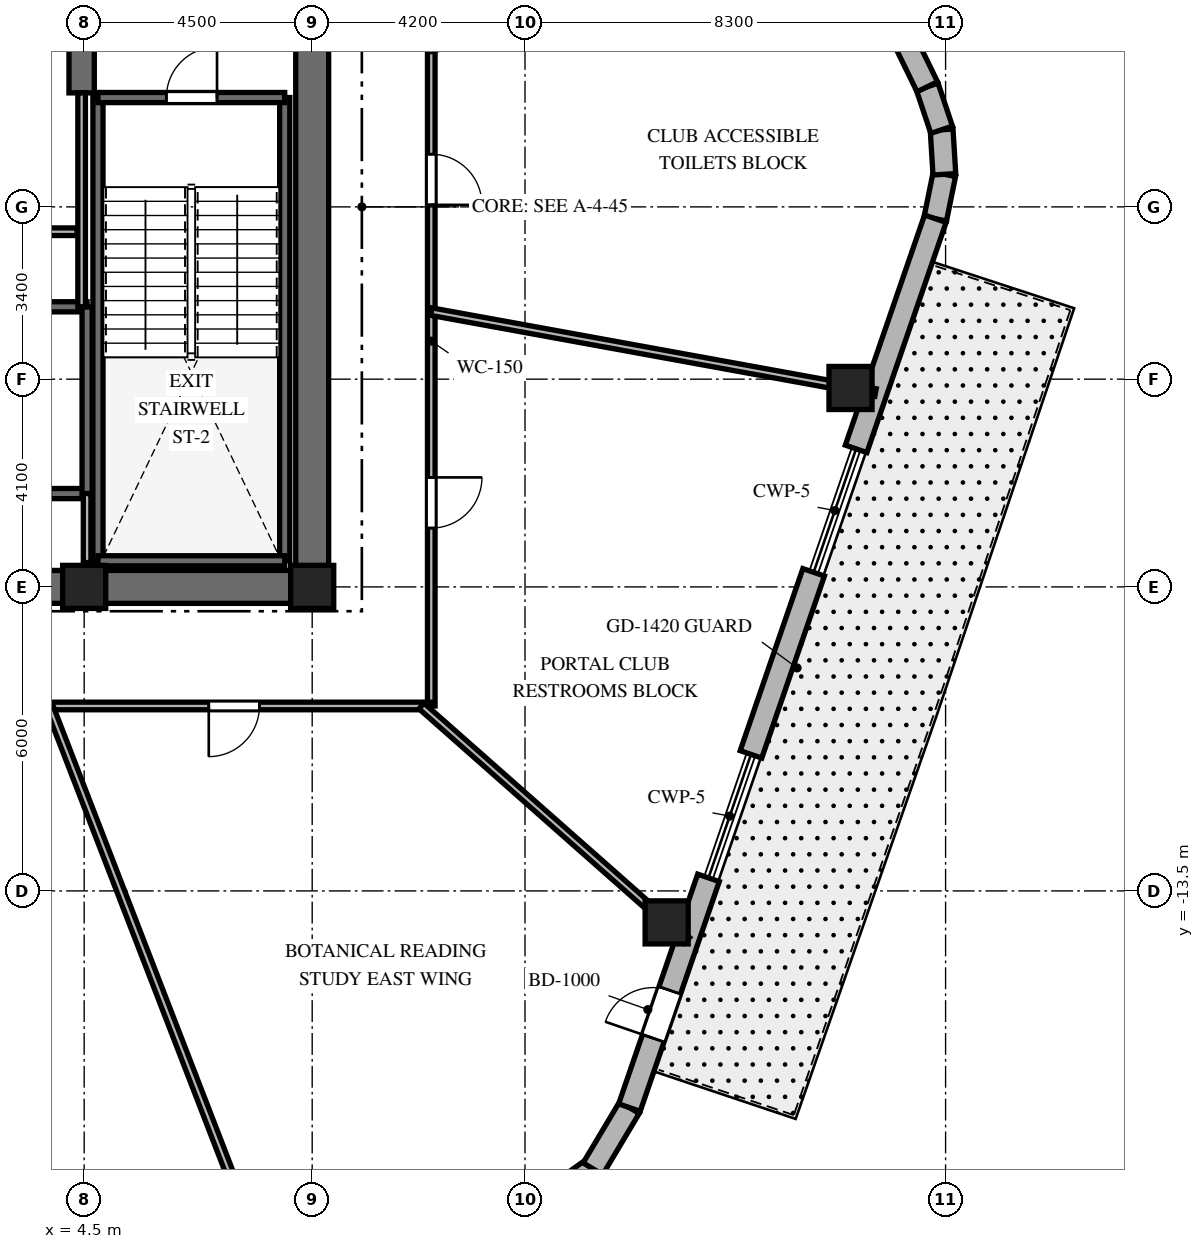
"""IFC4 building model, lengths in metres.
Left out: names, types, materials, properties, quantities, classifications, styles, units other than length and angle.
Written with IfcOpenShell. Run it as: python <this file> out.ifc"""

import sys

from ifc_helpers import new_model, si_unit, direction, frame, frame_2d, origin, origin_2d, place, context, subcontext, project, spatial, rectangle, extrude, element, fill, save


model = new_model("IFC4")
c1 = context("Model", 3, precision=1e-05, world=origin(), true_north=direction((0.0, 1.0)))
c2 = subcontext(c1, "Body", "Model", "MODEL_VIEW")
j1 = project(units=[si_unit("LENGTHUNIT", "METRE"), si_unit("PLANEANGLEUNIT", "RADIAN")], contexts=[c1])
p1 = place(None, origin())
s1 = spatial("IfcSite", under=j1, at=p1, CompositionType="ELEMENT")
p2 = place(p1, origin())
s2 = spatial("IfcBuilding", under=s1, at=p2, CompositionType="ELEMENT")
p3 = place(p2, frame((0.0, 0.0, 293.1)))
s3 = spatial("IfcBuildingStorey", under=s2, at=p3, CompositionType="ELEMENT", Elevation=293.1)
p4 = place(p3, frame((-9.325, -7.5, 0.0), z_axis=(0.0, 0.0, 1.0), x_axis=(1.0, 0.0, 0.0)))
e1 = element("IfcWall", 1, at=p4, inside=s3, PredefinedType="SHEAR", context=c2, shape_type="SweptSolid", body=[
    extrude(rectangle(XDim=18.65, YDim=0.65, at=frame_2d((9.325, 0.0))), origin(), (0.0, 0.0, 1.0), 4.5),
])
p5 = place(p4, frame((9.375, 0.0, 0.0)))
e2 = element("IfcOpeningElement", 2, at=p5, cuts=e1, PredefinedType="OPENING", context=c2, shape_type="SweptSolid", body=[
    extrude(rectangle(XDim=1.0, YDim=2.15, at=frame_2d((0.5, 1.075))), frame((0.0, 0.335, 0.0), z_axis=(0.0, -1.0, 0.0), x_axis=(1.0, 0.0, 0.0)), (0.0, 0.0, 1.0), 0.67),
])
p6 = place(p3, frame((9.0, -7.175, 0.0), z_axis=(0.0, 0.0, 1.0), x_axis=(0.0, 1.0, 0.0)))
e3 = element("IfcWall", 3, at=p6, inside=s3, PredefinedType="SHEAR", context=c2, shape_type="SweptSolid", body=[
    extrude(rectangle(XDim=14.35, YDim=0.65, at=frame_2d((7.175, 0.0))), origin(), (0.0, 0.0, 1.0), 4.5),
])
p7 = place(p6, frame((10.3, 0.0, 0.0)))
e4 = element("IfcOpeningElement", 4, at=p7, cuts=e3, PredefinedType="OPENING", context=c2, shape_type="SweptSolid", body=[
    extrude(rectangle(XDim=1.05, YDim=2.15, at=frame_2d((0.525, 1.075))), frame((0.0, 0.335, 0.0), z_axis=(0.0, -1.0, 0.0), x_axis=(1.0, 0.0, 0.0)), (0.0, 0.0, 1.0), 0.67),
])
p8 = place(p3, frame((4.45, 2.25, 0.0), z_axis=(0.0, 0.0, 1.0), x_axis=(0.0, 1.0, 0.0)))
e5 = element("IfcWall", 5, at=p8, inside=s3, PredefinedType="SHEAR", context=c2, shape_type="SweptSolid", body=[
    extrude(rectangle(XDim=4.925, YDim=0.5, at=frame_2d((2.462, 0.0))), origin(), (0.0, 0.0, 1.0), 4.5),
])
for number, where, z_axis, x_axis in (
    (6, (4.772, -6.985, 0.0), (0.0, 0.0, 1.0), (0.0, 1.0, 0.0)),
    (7, (8.458, -6.985, 0.0), (0.0, 0.0, 1.0), (0.0, 1.0, 0.0)),
):
    element("IfcWall", number, at=place(p3, frame(where, z_axis=z_axis, x_axis=x_axis)), inside=s3, PredefinedType="SHEAR", context=c2, shape_type="SweptSolid", body=[
        extrude(rectangle(XDim=9.143, YDim=0.2, at=frame_2d((4.572, 0.0))), origin(), (0.0, 0.0, 1.0), 4.5),
    ])
p9 = place(p3, frame((4.772, -6.985, 0.0), z_axis=(0.0, 0.0, 1.0), x_axis=(1.0, 0.0, 0.0)))
e8 = element("IfcWall", 8, at=p9, inside=s3, PredefinedType="SHEAR", context=c2, shape_type="SweptSolid", body=[
    extrude(rectangle(XDim=3.686, YDim=0.2, at=frame_2d((1.843, 0.0))), origin(), (0.0, 0.0, 1.0), 4.5),
])
p10 = place(p3, frame((4.772, 2.158, 0.0), z_axis=(0.0, 0.0, 1.0), x_axis=(1.0, 0.0, 0.0)))
e9 = element("IfcWall", 9, at=p10, inside=s3, PredefinedType="SHEAR", context=c2, shape_type="SweptSolid", body=[
    extrude(rectangle(XDim=3.686, YDim=0.2, at=frame_2d((1.843, 0.0))), origin(), (0.0, 0.0, 1.0), 4.5),
])
p11 = place(p10, frame((1.35, 0.0, 0.0)))
e10 = element("IfcOpeningElement", 10, at=p11, cuts=e9, PredefinedType="OPENING", context=c2, shape_type="SweptSolid", body=[
    extrude(rectangle(XDim=1.0, YDim=2.15, at=frame_2d((0.5, 1.075))), frame((0.0, 0.11, 0.0), z_axis=(0.0, -1.0, 0.0), x_axis=(1.0, 0.0, 0.0)), (0.0, 0.0, 1.0), 0.22),
])
p12 = place(p3, frame((-4.608, -5.658, 0.0), z_axis=(0.0, 0.0, 1.0), x_axis=(1.0, 0.0, 0.0)))
e11 = element("IfcWall", 11, at=p12, inside=s3, PredefinedType="SHEAR", context=c2, shape_type="SweptSolid", body=[
    extrude(rectangle(XDim=9.166, YDim=0.2, at=frame_2d((4.583, 0.0))), origin(), (0.0, 0.0, 1.0), 4.5),
])
p13 = place(p12, frame((7.45, 0.0, 0.0)))
e12 = element("IfcOpeningElement", 12, at=p13, cuts=e11, PredefinedType="OPENING", context=c2, shape_type="SweptSolid", body=[
    extrude(rectangle(XDim=1.0, YDim=2.15, at=frame_2d((0.5, 1.075))), frame((0.0, 0.11, 0.0), z_axis=(0.0, -1.0, 0.0), x_axis=(1.0, 0.0, 0.0)), (0.0, 0.0, 1.0), 0.22),
])
p14 = place(p3, frame((-4.608, -1.972, 0.0), z_axis=(0.0, 0.0, 1.0), x_axis=(1.0, 0.0, 0.0)))
e13 = element("IfcWall", 13, at=p14, inside=s3, PredefinedType="SHEAR", context=c2, shape_type="SweptSolid", body=[
    extrude(rectangle(XDim=9.166, YDim=0.2, at=frame_2d((4.583, 0.0))), origin(), (0.0, 0.0, 1.0), 4.5),
])
p15 = place(p3, frame((4.558, -5.658, 0.0), z_axis=(0.0, 0.0, 1.0), x_axis=(0.0, 1.0, 0.0)))
e14 = element("IfcWall", 14, at=p15, inside=s3, PredefinedType="SHEAR", context=c2, shape_type="SweptSolid", body=[
    extrude(rectangle(XDim=3.686, YDim=0.2, at=frame_2d((1.843, 0.0))), origin(), (0.0, 0.0, 1.0), 4.5),
])
for number, where, z_axis, x_axis in (
    (15, (4.5, -7.5, 0.0), (0.0, 0.0, 1.0), (1.0, 0.0, 0.0)),
    (16, (9.0, -7.5, 0.0), (0.0, 0.0, 1.0), (1.0, 0.0, 0.0)),
    (17, (15.995, -14.121, 0.0), (0.0, 0.0, 1.0), (1.0, 0.0, 0.0)),
    (18, (19.624, -3.574, 0.0), (0.0, 0.0, 1.0), (1.0, 0.0, 0.0)),
):
    element("IfcColumn", number, at=place(p3, frame(where, z_axis=z_axis, x_axis=x_axis)), inside=s3, PredefinedType="COLUMN", context=c2, shape_type="SweptSolid", body=[
        extrude(rectangle(XDim=0.85, YDim=0.85, at=origin_2d()), origin(), (0.0, 0.0, 1.0), 4.5),
    ])
p16 = place(p3, frame((13.415, -19.787, 0.0), z_axis=(0.0, 0.0, 1.0), x_axis=(0.814055493997, 0.580787097561, 0.0)))
e19 = element("IfcWall", 19, at=p16, inside=s3, PredefinedType="SOLIDWALL", context=c2, shape_type="SweptSolid", body=[
    extrude(rectangle(XDim=1.383, YDim=0.45, at=frame_2d((0.691, 0.0))), origin(), (0.0, 0.0, 1.0), 4.18),
])
p17 = place(p3, frame((14.54, -18.984, 0.0), z_axis=(0.0, 0.0, 1.0), x_axis=(0.512374906623, 0.858761873317, 0.0)))
e20 = element("IfcWall", 20, at=p17, inside=s3, PredefinedType="SOLIDWALL", context=c2, shape_type="SweptSolid", body=[
    extrude(rectangle(XDim=1.406, YDim=0.45, at=frame_2d((0.703, 0.0))), origin(), (0.0, 0.0, 1.0), 4.18),
])
p18 = place(p3, frame((21.298, -0.233, 0.0), z_axis=(0.0, 0.0, 1.0), x_axis=(0.199158176661, 0.979967356941, 0.0)))
e21 = element("IfcWall", 21, at=p18, inside=s3, PredefinedType="SOLIDWALL", context=c2, shape_type="SweptSolid", body=[
    extrude(rectangle(XDim=0.895, YDim=0.45, at=frame_2d((0.447, 0.0))), origin(), (0.0, 0.0, 1.0), 4.18),
])
p19 = place(p3, frame((21.476, 0.644, 0.0), z_axis=(0.0, 0.0, 1.0), x_axis=(-0.061031097918, 0.998135865044, 0.0)))
e22 = element("IfcWall", 22, at=p19, inside=s3, PredefinedType="SOLIDWALL", context=c2, shape_type="SweptSolid", body=[
    extrude(rectangle(XDim=0.88, YDim=0.45, at=frame_2d((0.44, 0.0))), origin(), (0.0, 0.0, 1.0), 4.18),
])
p20 = place(p3, frame((21.422, 1.522, 0.0), z_axis=(0.0, 0.0, 1.0), x_axis=(-0.316964162323, 0.94843751497, 0.0)))
e23 = element("IfcWall", 23, at=p20, inside=s3, PredefinedType="SOLIDWALL", context=c2, shape_type="SweptSolid", body=[
    extrude(rectangle(XDim=0.895, YDim=0.45, at=frame_2d((0.448, 0.0))), origin(), (0.0, 0.0, 1.0), 4.18),
])
p21 = place(p3, frame((15.26, -17.776, 0.0), z_axis=(0.0, 0.0, 1.0), x_axis=(0.325408461582, 0.945573547182, 0.0)))
e24 = element("IfcWall", 24, at=p21, inside=s3, PredefinedType="SOLIDWALL", context=c2, shape_type="SweptSolid", body=[
    extrude(rectangle(XDim=4.795, YDim=0.45, at=frame_2d((2.397, 0.0))), origin(), (0.0, 0.0, 1.0), 4.18),
])
p22 = place(p21, frame((1.447, 0.0, 0.0)))
e25 = element("IfcOpeningElement", 25, at=p22, cuts=e24, PredefinedType="OPENING", context=c2, shape_type="SweptSolid", body=[
    extrude(rectangle(XDim=1.0, YDim=2.15, at=frame_2d((0.5, 1.075))), frame((0.0, 0.235, 0.0), z_axis=(0.0, -1.0, 0.0), x_axis=(1.0, 0.0, 0.0)), (0.0, 0.0, 1.0), 0.47),
])
p23 = place(p3, frame((17.659, -10.805, 0.0), z_axis=(0.0, 0.0, 1.0), x_axis=(0.325406534544, 0.945574210349, 0.0)))
e26 = element("IfcWall", 26, at=p23, inside=s3, PredefinedType="SOLIDWALL", context=c2, shape_type="SweptSolid", body=[
    extrude(rectangle(XDim=3.8, YDim=0.45, at=frame_2d((1.9, 0.0))), origin(), (0.0, 0.0, 1.0), 4.18),
])
p24 = place(p3, frame((19.734, -4.775, 0.0), z_axis=(0.0, 0.0, 1.0), x_axis=(0.325437701015, 0.945563484256, 0.0)))
e27 = element("IfcWall", 27, at=p24, inside=s3, PredefinedType="SOLIDWALL", context=c2, shape_type="SweptSolid", body=[
    extrude(rectangle(XDim=4.803, YDim=0.45, at=frame_2d((2.402, 0.0))), origin(), (0.0, 0.0, 1.0), 4.18),
])
p25 = place(p3, frame((21.138, 2.371, 0.0), z_axis=(0.0, 0.0, 1.0), x_axis=(-0.438135313339, 0.898909031663, 0.0)))
e28 = element("IfcWall", 28, at=p25, inside=s3, PredefinedType="SOLIDWALL", context=c2, shape_type="SweptSolid", body=[
    extrude(rectangle(XDim=4.605, YDim=0.45, at=frame_2d((2.302, 0.0))), origin(), (0.0, 0.0, 1.0), 4.18),
])
p26 = place(p3, frame((4.558, -7.02, 0.0), z_axis=(0.0, 0.0, 1.0), x_axis=(0.0, 1.0, 0.0)))
e29 = element("IfcWall", 29, at=p26, inside=s3, PredefinedType="PARTITIONING", context=c2, shape_type="SweptSolid", body=[
    extrude(rectangle(XDim=1.362, YDim=0.15, at=frame_2d((0.681, 0.0))), origin(), (0.0, 0.0, 1.0), 4.18),
])
p27 = place(p3, frame((4.45, -1.972, 0.0), z_axis=(0.0, 0.0, 1.0), x_axis=(0.0, 1.0, 0.0)))
e30 = element("IfcWall", 30, at=p27, inside=s3, PredefinedType="PARTITIONING", context=c2, shape_type="SweptSolid", body=[
    extrude(rectangle(XDim=4.222, YDim=0.15, at=frame_2d((2.111, 0.0))), origin(), (0.0, 0.0, 1.0), 4.18),
])
p28 = place(p3, frame((-4.36, -0.49, 0.0), z_axis=(0.0, 0.0, 1.0), x_axis=(1.0, 0.0, 0.0)))
e31 = element("IfcWall", 31, at=p28, inside=s3, PredefinedType="PARTITIONING", context=c2, shape_type="SweptSolid", body=[
    extrude(rectangle(XDim=8.72, YDim=0.15, at=frame_2d((4.36, 0.0))), origin(), (0.0, 0.0, 1.0), 4.18),
])
p29 = place(p28, frame((3.86, 0.0, 0.0)))
e32 = element("IfcOpeningElement", 32, at=p29, cuts=e31, PredefinedType="OPENING", context=c2, shape_type="SweptSolid", body=[
    extrude(rectangle(XDim=0.9, YDim=2.03, at=frame_2d((0.45, 1.015))), frame((0.0, 0.085, 0.0), z_axis=(0.0, -1.0, 0.0), x_axis=(1.0, 0.0, 0.0)), (0.0, 0.0, 1.0), 0.17),
])
p30 = place(p3, frame((11.35, 9.85, 0.0), z_axis=(0.0, 0.0, 1.0), x_axis=(0.0, -1.0, 0.0)))
e33 = element("IfcWall", 33, at=p30, inside=s3, PredefinedType="PARTITIONING", context=c2, shape_type="SweptSolid", body=[
    extrude(rectangle(XDim=19.7, YDim=0.15, at=frame_2d((9.85, 0.0))), origin(), (0.0, 0.0, 1.0), 3.67),
])
p31 = place(p30, frame((2.973, 0.0, 0.0)))
e34 = element("IfcOpeningElement", 34, at=p31, cuts=e33, PredefinedType="OPENING", context=c2, shape_type="SweptSolid", body=[
    extrude(rectangle(XDim=1.0, YDim=2.03, at=frame_2d((0.5, 1.015))), frame((0.0, 0.085, 0.0), z_axis=(0.0, -1.0, 0.0), x_axis=(1.0, 0.0, 0.0)), (0.0, 0.0, 1.0), 0.17),
])
p32 = place(p30, frame((15.189, 0.0, 0.0)))
e35 = element("IfcOpeningElement", 35, at=p32, cuts=e33, PredefinedType="OPENING", context=c2, shape_type="SweptSolid", body=[
    extrude(rectangle(XDim=1.0, YDim=2.03, at=frame_2d((0.5, 1.015))), frame((0.0, 0.085, 0.0), z_axis=(0.0, -1.0, 0.0), x_axis=(1.0, 0.0, 0.0)), (0.0, 0.0, 1.0), 0.17),
])
p33 = place(p30, frame((8.81, 0.0, 0.0)))
e36 = element("IfcOpeningElement", 36, at=p33, cuts=e33, PredefinedType="OPENING", context=c2, shape_type="SweptSolid", body=[
    extrude(rectangle(XDim=1.0, YDim=2.03, at=frame_2d((0.5, 1.015))), frame((0.0, 0.085, 0.0), z_axis=(0.0, -1.0, 0.0), x_axis=(1.0, 0.0, 0.0)), (0.0, 0.0, 1.0), 0.17),
])
p34 = place(p3, frame((11.35, -9.85, 0.0), z_axis=(0.0, 0.0, 1.0), x_axis=(-1.0, 0.0, 0.0)))
e37 = element("IfcWall", 37, at=p34, inside=s3, PredefinedType="PARTITIONING", context=c2, shape_type="SweptSolid", body=[
    extrude(rectangle(XDim=22.7, YDim=0.15, at=frame_2d((11.35, 0.0))), origin(), (0.0, 0.0, 1.0), 3.67),
])
p35 = place(p34, frame((17.22, 0.0, 0.0)))
e38 = element("IfcOpeningElement", 38, at=p35, cuts=e37, PredefinedType="OPENING", context=c2, shape_type="SweptSolid", body=[
    extrude(rectangle(XDim=1.0, YDim=2.03, at=frame_2d((0.5, 1.015))), frame((0.0, 0.085, 0.0), z_axis=(0.0, -1.0, 0.0), x_axis=(1.0, 0.0, 0.0)), (0.0, 0.0, 1.0), 0.17),
])
p36 = place(p34, frame((10.429, 0.0, 0.0)))
e39 = element("IfcOpeningElement", 39, at=p36, cuts=e37, PredefinedType="OPENING", context=c2, shape_type="SweptSolid", body=[
    extrude(rectangle(XDim=1.0, YDim=2.03, at=frame_2d((0.5, 1.015))), frame((0.0, 0.085, 0.0), z_axis=(0.0, -1.0, 0.0), x_axis=(1.0, 0.0, 0.0)), (0.0, 0.0, 1.0), 0.17),
])
p37 = place(p34, frame((3.391, 0.0, 0.0)))
e40 = element("IfcOpeningElement", 40, at=p37, cuts=e37, PredefinedType="OPENING", context=c2, shape_type="SweptSolid", body=[
    extrude(rectangle(XDim=1.0, YDim=2.03, at=frame_2d((0.5, 1.015))), frame((0.0, 0.085, 0.0), z_axis=(0.0, -1.0, 0.0), x_axis=(1.0, 0.0, 0.0)), (0.0, 0.0, 1.0), 0.17),
])
p38 = place(p3, frame((3.808, -9.85, 0.0), z_axis=(0.0, 0.0, 1.0), x_axis=(0.360587327934, -0.932725457427, 0.0)))
e41 = element("IfcWall", 41, at=p38, inside=s3, PredefinedType="PARTITIONING", context=c2, shape_type="SweptSolid", body=[
    extrude(rectangle(XDim=10.962, YDim=0.15, at=frame_2d((5.481, 0.0))), origin(), (0.0, 0.0, 1.0), 3.52),
])
p39 = place(p3, frame((11.157, -9.85, 0.0), z_axis=(0.0, 0.0, 1.0), x_axis=(0.74966962095, -0.661812253909, 0.0)))
e42 = element("IfcWall", 42, at=p39, inside=s3, PredefinedType="PARTITIONING", context=c2, shape_type="SweptSolid", body=[
    extrude(rectangle(XDim=6.989, YDim=0.15, at=frame_2d((3.494, 0.0))), origin(), (0.0, 0.0, 1.0), 3.52),
])
p40 = place(p3, frame((11.35, -2.067, 0.0), z_axis=(0.0, 0.0, 1.0), x_axis=(0.983816386236, -0.179179569634, 0.0)))
e43 = element("IfcWall", 43, at=p40, inside=s3, PredefinedType="PARTITIONING", context=c2, shape_type="SweptSolid", body=[
    extrude(rectangle(XDim=8.911, YDim=0.15, at=frame_2d((4.456, 0.0))), origin(), (0.0, 0.0, 1.0), 3.52),
])
p41 = place(p22, origin())
e44 = element("IfcDoor", 44, at=p41, inside=s3, OperationType="SINGLE_SWING_LEFT", PredefinedType="DOOR", context=c2, shape_type="SweptSolid", body=[
    extrude(rectangle(XDim=1.0, YDim=2.15, at=frame_2d((0.5, 1.075))), frame((0.0, 0.025, 0.0), z_axis=(0.0, -1.0, 0.0), x_axis=(1.0, 0.0, 0.0)), (0.0, 0.0, 1.0), 0.05),
])
fill(e25, e44)
p42 = place(p11, origin())
e45 = element("IfcDoor", 45, at=p42, inside=s3, OperationType="SINGLE_SWING_RIGHT", PredefinedType="DOOR", context=c2, shape_type="SweptSolid", body=[
    extrude(rectangle(XDim=1.0, YDim=2.15, at=frame_2d((0.5, 1.075))), frame((0.0, 0.025, 0.0), z_axis=(0.0, -1.0, 0.0), x_axis=(1.0, 0.0, 0.0)), (0.0, 0.0, 1.0), 0.05),
])
fill(e10, e45)
p43 = place(p37, origin())
e46 = element("IfcDoor", 46, at=p43, inside=s3, OperationType="SINGLE_SWING_RIGHT", PredefinedType="DOOR", context=c2, shape_type="SweptSolid", body=[
    extrude(rectangle(XDim=1.0, YDim=2.03, at=frame_2d((0.5, 1.015))), frame((0.0, 0.025, 0.0), z_axis=(0.0, -1.0, 0.0), x_axis=(1.0, 0.0, 0.0)), (0.0, 0.0, 1.0), 0.05),
])
fill(e40, e46)
p44 = place(p32, origin())
e47 = element("IfcDoor", 47, at=p44, inside=s3, OperationType="SINGLE_SWING_LEFT", PredefinedType="DOOR", context=c2, shape_type="SweptSolid", body=[
    extrude(rectangle(XDim=1.0, YDim=2.03, at=frame_2d((0.5, 1.015))), frame((0.0, 0.025, 0.0), z_axis=(0.0, -1.0, 0.0), x_axis=(1.0, 0.0, 0.0)), (0.0, 0.0, 1.0), 0.05),
])
fill(e35, e47)
p45 = place(p33, origin())
e48 = element("IfcDoor", 48, at=p45, inside=s3, OperationType="SINGLE_SWING_RIGHT", PredefinedType="DOOR", context=c2, shape_type="SweptSolid", body=[
    extrude(rectangle(XDim=1.0, YDim=2.03, at=frame_2d((0.5, 1.015))), frame((0.0, 0.025, 0.0), z_axis=(0.0, -1.0, 0.0), x_axis=(1.0, 0.0, 0.0)), (0.0, 0.0, 1.0), 0.05),
])
fill(e36, e48)
save(model, sys.argv[1])
